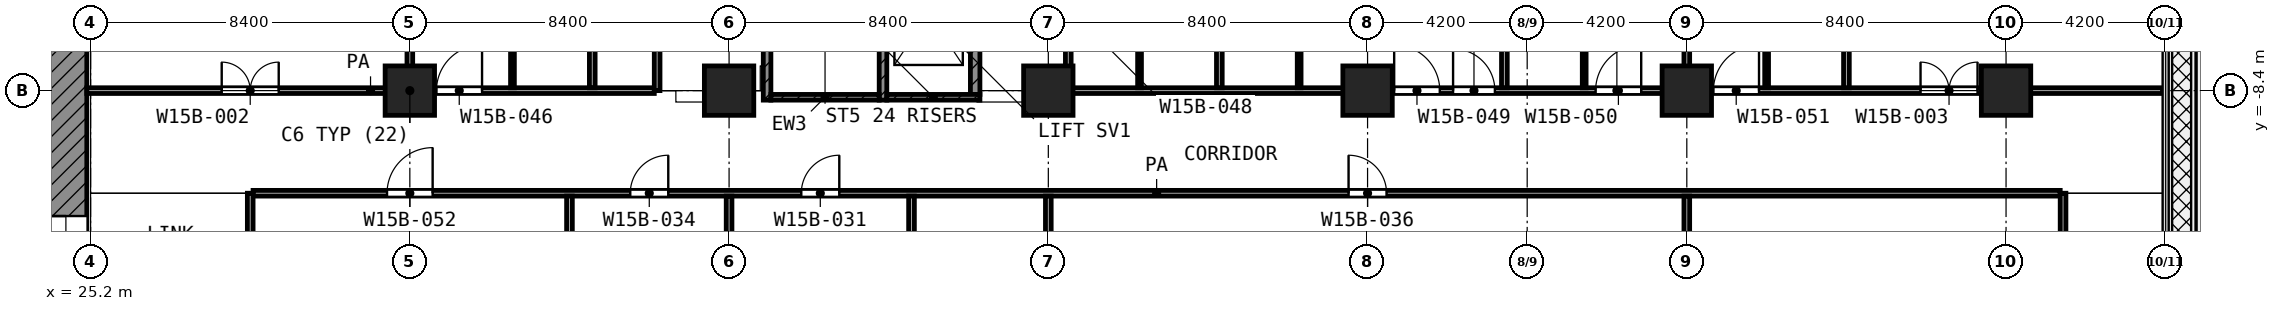
"""IFC4 building model, lengths in metres.
Left out: names, types, materials, properties, quantities, classifications, styles, units other than length and angle.
Written with IfcOpenShell. Run it as: python <this file> out.ifc"""

import sys

from ifc_helpers import new_model, si_unit, direction, frame, frame_2d, origin, origin_2d, place, context, subcontext, project, spatial, rectangle, extrude, element, fill, save


model = new_model("IFC4")
c1 = context("Model", 3, precision=1e-05, world=origin(), true_north=direction((0.0, 1.0)))
c2 = subcontext(c1, "Body", "Model", "MODEL_VIEW")
j1 = project(units=[si_unit("LENGTHUNIT", "METRE"), si_unit("PLANEANGLEUNIT", "RADIAN")], contexts=[c1])
p1 = place(None, origin())
s1 = spatial("IfcSite", under=j1, at=p1, CompositionType="ELEMENT")
p2 = place(p1, origin())
s2 = spatial("IfcBuilding", under=s1, at=p2, CompositionType="ELEMENT")
p3 = place(p2, frame((0.0, 0.0, 85.4)))
s3 = spatial("IfcBuildingStorey", under=s2, at=p3, CompositionType="ELEMENT", Elevation=85.4)
for number, where, z_axis, x_axis in (
    (1, (33.6, -8.4, 0.0), (0.0, 0.0, 1.0), (1.0, 0.0, 0.0)),
    (2, (42.0, -8.4, 0.0), (0.0, 0.0, 1.0), (1.0, 0.0, 0.0)),
    (3, (50.4, -8.4, 0.0), (0.0, 0.0, 1.0), (1.0, 0.0, 0.0)),
    (4, (58.8, -8.4, 0.0), (0.0, 0.0, 1.0), (1.0, 0.0, 0.0)),
    (5, (67.2, -8.4, 0.0), (0.0, 0.0, 1.0), (1.0, 0.0, 0.0)),
    (6, (75.6, -8.4, 0.0), (0.0, 0.0, 1.0), (1.0, 0.0, 0.0)),
):
    element("IfcColumn", number, at=place(p3, frame(where, z_axis=z_axis, x_axis=x_axis)), inside=s3, PredefinedType="COLUMN", context=c2, shape_type="SweptSolid", body=[
        extrude(rectangle(XDim=1.3, YDim=1.3, at=origin_2d()), origin(), (0.0, 0.0, 1.0), 4.2),
    ])
p4 = place(p3, frame((24.55, -24.0, 0.0), z_axis=(0.0, 0.0, 1.0), x_axis=(0.0, 1.0, 0.0)))
e7 = element("IfcWall", 7, at=p4, inside=s3, PredefinedType="SHEAR", context=c2, shape_type="SweptSolid", body=[
    extrude(rectangle(XDim=18.6, YDim=1.1, at=frame_2d((9.3, 0.0))), origin(), (0.0, 0.0, 1.0), 3.9),
])
p5 = place(p4, frame((10.5, 0.0, 0.0)))
e8 = element("IfcOpeningElement", 8, at=p5, cuts=e7, PredefinedType="OPENING", context=c2, shape_type="SweptSolid", body=[
    extrude(rectangle(XDim=1.8, YDim=2.1, at=frame_2d((0.9, 1.05))), frame((0.0, 0.56, 0.0), z_axis=(0.0, -1.0, 0.0), x_axis=(1.0, 0.0, 0.0)), (0.0, 0.0, 1.0), 1.12),
])
p6 = place(p3, frame((43.0, -8.65, 0.0), z_axis=(0.0, 0.0, 1.0), x_axis=(0.0, 1.0, 0.0)))
e9 = element("IfcWall", 9, at=p6, inside=s3, PredefinedType="SHEAR", context=c2, shape_type="SweptSolid", body=[
    extrude(rectangle(XDim=8.35, YDim=0.2, at=frame_2d((4.175, 0.0))), origin(), (0.0, 0.0, 1.0), 3.9),
])
p7 = place(p6, frame((7.0, 0.0, 0.0)))
e10 = element("IfcOpeningElement", 10, at=p7, cuts=e9, PredefinedType="OPENING", context=c2, shape_type="SweptSolid", body=[
    extrude(rectangle(XDim=1.1, YDim=2.1, at=frame_2d((0.55, 1.05))), frame((0.0, 0.11, 0.0), z_axis=(0.0, -1.0, 0.0), x_axis=(1.0, 0.0, 0.0)), (0.0, 0.0, 1.0), 0.22),
])
p8 = place(p3, frame((46.05, -8.65, 0.0), z_axis=(0.0, 0.0, 1.0), x_axis=(0.0, 1.0, 0.0)))
e11 = element("IfcWall", 11, at=p8, inside=s3, PredefinedType="SHEAR", context=c2, shape_type="SweptSolid", body=[
    extrude(rectangle(XDim=8.35, YDim=0.2, at=frame_2d((4.175, 0.0))), origin(), (0.0, 0.0, 1.0), 3.9),
])
p9 = place(p8, frame((7.0, 0.0, 0.0)))
e12 = element("IfcOpeningElement", 12, at=p9, cuts=e11, PredefinedType="OPENING", context=c2, shape_type="SweptSolid", body=[
    extrude(rectangle(XDim=1.1, YDim=2.1, at=frame_2d((0.55, 1.05))), frame((0.0, 0.11, 0.0), z_axis=(0.0, -1.0, 0.0), x_axis=(1.0, 0.0, 0.0)), (0.0, 0.0, 1.0), 0.22),
])
p10 = place(p3, frame((43.1, -8.575, 0.0), z_axis=(0.0, 0.0, 1.0), x_axis=(1.0, 0.0, 0.0)))
e13 = element("IfcWall", 13, at=p10, inside=s3, PredefinedType="SHEAR", context=c2, shape_type="SweptSolid", body=[
    extrude(rectangle(XDim=2.85, YDim=0.15, at=frame_2d((1.425, 0.0))), origin(), (0.0, 0.0, 1.0), 3.9),
])
p11 = place(p3, frame((46.15, -8.575, 0.0), z_axis=(0.0, 0.0, 1.0), x_axis=(1.0, 0.0, 0.0)))
e14 = element("IfcWall", 14, at=p11, inside=s3, PredefinedType="SHEAR", context=c2, shape_type="SweptSolid", body=[
    extrude(rectangle(XDim=2.45, YDim=0.15, at=frame_2d((1.225, 0.0))), origin(), (0.0, 0.0, 1.0), 3.9),
])
p12 = place(p3, frame((48.475, -8.5, 0.0), z_axis=(0.0, 0.0, 1.0), x_axis=(0.0, 1.0, 0.0)))
e15 = element("IfcWall", 15, at=p12, inside=s3, PredefinedType="SHEAR", context=c2, shape_type="SweptSolid", body=[
    extrude(rectangle(XDim=3.475, YDim=0.25, at=frame_2d((1.738, 0.0))), origin(), (0.0, 0.0, 1.0), 3.9),
])
p13 = place(p3, frame((36.3, -8.325, 0.0), z_axis=(0.0, 0.0, 1.0), x_axis=(0.0, 1.0, 0.0)))
e16 = element("IfcWall", 16, at=p13, inside=s3, PredefinedType="PARTITIONING", context=c2, shape_type="SweptSolid", body=[
    extrude(rectangle(XDim=2.625, YDim=0.1, at=frame_2d((1.312, 0.0))), origin(), (0.0, 0.0, 1.0), 3.9),
])
p14 = place(p3, frame((52.8, -8.325, 0.0), z_axis=(0.0, 0.0, 1.0), x_axis=(0.0, 1.0, 0.0)))
e17 = element("IfcWall", 17, at=p14, inside=s3, PredefinedType="PARTITIONING", context=c2, shape_type="SweptSolid", body=[
    extrude(rectangle(XDim=3.225, YDim=0.1, at=frame_2d((1.612, 0.0))), origin(), (0.0, 0.0, 1.0), 3.9),
])
p15 = place(p3, frame((57.0, -8.325, 0.0), z_axis=(0.0, 0.0, 1.0), x_axis=(0.0, 1.0, 0.0)))
e18 = element("IfcWall", 18, at=p15, inside=s3, PredefinedType="PARTITIONING", context=c2, shape_type="SweptSolid", body=[
    extrude(rectangle(XDim=2.624, YDim=0.1, at=frame_2d((1.312, 0.0))), origin(), (0.0, 0.0, 1.0), 3.9),
])
for number, where, z_axis, x_axis in (
    (19, (64.5, -8.325, 0.0), (0.0, 0.0, 1.0), (0.0, 1.0, 0.0)),
    (20, (69.3, -8.325, 0.0), (0.0, 0.0, 1.0), (0.0, 1.0, 0.0)),
):
    element("IfcWall", number, at=place(p3, frame(where, z_axis=z_axis, x_axis=x_axis)), inside=s3, PredefinedType="PARTITIONING", context=c2, shape_type="SweptSolid", body=[
        extrude(rectangle(XDim=2.625, YDim=0.1, at=frame_2d((1.312, 0.0))), origin(), (0.0, 0.0, 1.0), 3.9),
    ])
p16 = place(p3, frame((29.475, -11.1, 0.0), z_axis=(0.0, 0.0, 1.0), x_axis=(1.0, 0.0, 0.0)))
e21 = element("IfcWall", 21, at=p16, inside=s3, PredefinedType="PARTITIONING", context=c2, shape_type="SweptSolid", body=[
    extrude(rectangle(XDim=47.55, YDim=0.15, at=frame_2d((23.775, 0.0))), origin(), (0.0, 0.0, 1.0), 3.9),
])
p17 = place(p16, frame((3.525, 0.0, 0.0)))
e22 = element("IfcOpeningElement", 22, at=p17, cuts=e21, PredefinedType="OPENING", context=c2, shape_type="SweptSolid", body=[
    extrude(rectangle(XDim=1.2, YDim=2.1, at=frame_2d((0.6, 1.05))), frame((0.0, 0.085, 0.0), z_axis=(0.0, -1.0, 0.0), x_axis=(1.0, 0.0, 0.0)), (0.0, 0.0, 1.0), 0.17),
])
p18 = place(p16, frame((9.925, 0.0, 0.0)))
e23 = element("IfcOpeningElement", 23, at=p18, cuts=e21, PredefinedType="OPENING", context=c2, shape_type="SweptSolid", body=[
    extrude(rectangle(XDim=1.0, YDim=2.1, at=frame_2d((0.5, 1.05))), frame((0.0, 0.085, 0.0), z_axis=(0.0, -1.0, 0.0), x_axis=(1.0, 0.0, 0.0)), (0.0, 0.0, 1.0), 0.17),
])
p19 = place(p16, frame((14.425, 0.0, 0.0)))
e24 = element("IfcOpeningElement", 24, at=p19, cuts=e21, PredefinedType="OPENING", context=c2, shape_type="SweptSolid", body=[
    extrude(rectangle(XDim=1.0, YDim=2.1, at=frame_2d((0.5, 1.05))), frame((0.0, 0.085, 0.0), z_axis=(0.0, -1.0, 0.0), x_axis=(1.0, 0.0, 0.0)), (0.0, 0.0, 1.0), 0.17),
])
p20 = place(p16, frame((28.825, 0.0, 0.0)))
e25 = element("IfcOpeningElement", 25, at=p20, cuts=e21, PredefinedType="OPENING", context=c2, shape_type="SweptSolid", body=[
    extrude(rectangle(XDim=1.0, YDim=2.1, at=frame_2d((0.5, 1.05))), frame((0.0, 0.085, 0.0), z_axis=(0.0, -1.0, 0.0), x_axis=(1.0, 0.0, 0.0)), (0.0, 0.0, 1.0), 0.17),
])
p21 = place(p3, frame((25.1, -8.4, 0.0), z_axis=(0.0, 0.0, 1.0), x_axis=(1.0, 0.0, 0.0)))
e26 = element("IfcWall", 26, at=p21, inside=s3, PredefinedType="PARTITIONING", context=c2, shape_type="SweptSolid", body=[
    extrude(rectangle(XDim=14.932, YDim=0.15, at=frame_2d((7.466, 0.0))), origin(), (0.0, 0.0, 1.0), 3.9),
])
p22 = place(p21, frame((3.55, 0.0, 0.0)))
e27 = element("IfcOpeningElement", 27, at=p22, cuts=e26, PredefinedType="OPENING", context=c2, shape_type="SweptSolid", body=[
    extrude(rectangle(XDim=1.5, YDim=2.1, at=frame_2d((0.75, 1.05))), frame((0.0, 0.085, 0.0), z_axis=(0.0, -1.0, 0.0), x_axis=(1.0, 0.0, 0.0)), (0.0, 0.0, 1.0), 0.17),
])
p23 = place(p21, frame((9.2, 0.0, 0.0)))
e28 = element("IfcOpeningElement", 28, at=p23, cuts=e26, PredefinedType="OPENING", context=c2, shape_type="SweptSolid", body=[
    extrude(rectangle(XDim=1.2, YDim=2.1, at=frame_2d((0.6, 1.05))), frame((0.0, 0.085, 0.0), z_axis=(0.0, -1.0, 0.0), x_axis=(1.0, 0.0, 0.0)), (0.0, 0.0, 1.0), 0.17),
])
p24 = place(p3, frame((51.0, -8.4, 0.0), z_axis=(0.0, 0.0, 1.0), x_axis=(1.0, 0.0, 0.0)))
e29 = element("IfcWall", 29, at=p24, inside=s3, PredefinedType="PARTITIONING", context=c2, shape_type="SweptSolid", body=[
    extrude(rectangle(XDim=28.72, YDim=0.15, at=frame_2d((14.36, 0.0))), origin(), (0.0, 0.0, 1.0), 3.9),
])
p25 = place(p24, frame((8.5, 0.0, 0.0)))
e30 = element("IfcOpeningElement", 30, at=p25, cuts=e29, PredefinedType="OPENING", context=c2, shape_type="SweptSolid", body=[
    extrude(rectangle(XDim=1.2, YDim=2.1, at=frame_2d((0.6, 1.05))), frame((0.0, 0.085, 0.0), z_axis=(0.0, -1.0, 0.0), x_axis=(1.0, 0.0, 0.0)), (0.0, 0.0, 1.0), 0.17),
])
p26 = place(p24, frame((10.05, 0.0, 0.0)))
e31 = element("IfcOpeningElement", 31, at=p26, cuts=e29, PredefinedType="OPENING", context=c2, shape_type="SweptSolid", body=[
    extrude(rectangle(XDim=1.1, YDim=2.1, at=frame_2d((0.55, 1.05))), frame((0.0, 0.085, 0.0), z_axis=(0.0, -1.0, 0.0), x_axis=(1.0, 0.0, 0.0)), (0.0, 0.0, 1.0), 0.17),
])
p27 = place(p24, frame((13.8, 0.0, 0.0)))
e32 = element("IfcOpeningElement", 32, at=p27, cuts=e29, PredefinedType="OPENING", context=c2, shape_type="SweptSolid", body=[
    extrude(rectangle(XDim=1.2, YDim=2.1, at=frame_2d((0.6, 1.05))), frame((0.0, 0.085, 0.0), z_axis=(0.0, -1.0, 0.0), x_axis=(1.0, 0.0, 0.0)), (0.0, 0.0, 1.0), 0.17),
])
p28 = place(p24, frame((16.9, 0.0, 0.0)))
e33 = element("IfcOpeningElement", 33, at=p28, cuts=e29, PredefinedType="OPENING", context=c2, shape_type="SweptSolid", body=[
    extrude(rectangle(XDim=1.2, YDim=2.1, at=frame_2d((0.6, 1.05))), frame((0.0, 0.085, 0.0), z_axis=(0.0, -1.0, 0.0), x_axis=(1.0, 0.0, 0.0)), (0.0, 0.0, 1.0), 0.17),
])
p29 = place(p24, frame((22.35, 0.0, 0.0)))
e34 = element("IfcOpeningElement", 34, at=p29, cuts=e29, PredefinedType="OPENING", context=c2, shape_type="SweptSolid", body=[
    extrude(rectangle(XDim=1.5, YDim=2.1, at=frame_2d((0.75, 1.05))), frame((0.0, 0.085, 0.0), z_axis=(0.0, -1.0, 0.0), x_axis=(1.0, 0.0, 0.0)), (0.0, 0.0, 1.0), 0.17),
])
p30 = place(p3, frame((29.4, -14.1, 0.0), z_axis=(0.0, 0.0, 1.0), x_axis=(0.0, 1.0, 0.0)))
e35 = element("IfcWall", 35, at=p30, inside=s3, PredefinedType="PARTITIONING", context=c2, shape_type="SweptSolid", body=[
    extrude(rectangle(XDim=3.0, YDim=0.15, at=frame_2d((1.5, 0.0))), origin(), (0.0, 0.0, 1.0), 3.9),
])
p31 = place(p3, frame((33.6, -8.325, 0.0), z_axis=(0.0, 0.0, 1.0), x_axis=(0.0, 1.0, 0.0)))
e36 = element("IfcWall", 36, at=p31, inside=s3, PredefinedType="PARTITIONING", context=c2, shape_type="SweptSolid", body=[
    extrude(rectangle(XDim=8.245, YDim=0.15, at=frame_2d((4.123, 0.0))), origin(), (0.0, 0.0, 1.0), 3.9),
])
p32 = place(p3, frame((37.8, -14.025, 0.0), z_axis=(0.0, 0.0, 1.0), x_axis=(0.0, 1.0, 0.0)))
e37 = element("IfcWall", 37, at=p32, inside=s3, PredefinedType="PARTITIONING", context=c2, shape_type="SweptSolid", body=[
    extrude(rectangle(XDim=2.85, YDim=0.15, at=frame_2d((1.425, 0.0))), origin(), (0.0, 0.0, 1.0), 3.9),
])
p33 = place(p3, frame((38.4, -8.325, 0.0), z_axis=(0.0, 0.0, 1.0), x_axis=(0.0, 1.0, 0.0)))
e38 = element("IfcWall", 38, at=p33, inside=s3, PredefinedType="PARTITIONING", context=c2, shape_type="SweptSolid", body=[
    extrude(rectangle(XDim=8.245, YDim=0.15, at=frame_2d((4.123, 0.0))), origin(), (0.0, 0.0, 1.0), 3.9),
])
p34 = place(p3, frame((40.107, -8.4, 0.0), z_axis=(0.0, 0.0, 1.0), x_axis=(0.0, 1.0, 0.0)))
e39 = element("IfcWall", 39, at=p34, inside=s3, PredefinedType="PARTITIONING", context=c2, shape_type="SweptSolid", body=[
    extrude(rectangle(XDim=8.32, YDim=0.15, at=frame_2d((4.16, 0.0))), origin(), (0.0, 0.0, 1.0), 3.9),
])
p35 = place(p34, frame((3.75, 0.0, 0.0)))
e40 = element("IfcOpeningElement", 40, at=p35, cuts=e39, PredefinedType="OPENING", context=c2, shape_type="SweptSolid", body=[
    extrude(rectangle(XDim=0.9, YDim=2.1, at=frame_2d((0.45, 1.05))), frame((0.0, 0.085, 0.0), z_axis=(0.0, -1.0, 0.0), x_axis=(1.0, 0.0, 0.0)), (0.0, 0.0, 1.0), 0.17),
])
for number, where, z_axis, x_axis in (
    (41, (42.0, -14.025, 0.0), (0.0, 0.0, 1.0), (0.0, 1.0, 0.0)),
    (42, (46.8, -14.025, 0.0), (0.0, 0.0, 1.0), (0.0, 1.0, 0.0)),
    (43, (50.4, -14.025, 0.0), (0.0, 0.0, 1.0), (0.0, 1.0, 0.0)),
):
    element("IfcWall", number, at=place(p3, frame(where, z_axis=z_axis, x_axis=x_axis)), inside=s3, PredefinedType="PARTITIONING", context=c2, shape_type="SweptSolid", body=[
        extrude(rectangle(XDim=2.85, YDim=0.15, at=frame_2d((1.425, 0.0))), origin(), (0.0, 0.0, 1.0), 3.9),
    ])
p36 = place(p3, frame((50.925, -8.4, 0.0), z_axis=(0.0, 0.0, 1.0), x_axis=(0.0, 1.0, 0.0)))
e44 = element("IfcWall", 44, at=p36, inside=s3, PredefinedType="PARTITIONING", context=c2, shape_type="SweptSolid", body=[
    extrude(rectangle(XDim=6.55, YDim=0.15, at=frame_2d((3.275, 0.0))), origin(), (0.0, 0.0, 1.0), 3.9),
])
p37 = place(p36, frame((3.767, 0.0, 0.0)))
e45 = element("IfcOpeningElement", 45, at=p37, cuts=e44, PredefinedType="OPENING", context=c2, shape_type="SweptSolid", body=[
    extrude(rectangle(XDim=1.2, YDim=2.1, at=frame_2d((0.6, 1.05))), frame((0.0, 0.085, 0.0), z_axis=(0.0, -1.0, 0.0), x_axis=(1.0, 0.0, 0.0)), (0.0, 0.0, 1.0), 0.17),
])
p38 = place(p36, frame((1.583, 0.0, 0.0)))
e46 = element("IfcOpeningElement", 46, at=p38, cuts=e44, PredefinedType="OPENING", context=c2, shape_type="SweptSolid", body=[
    extrude(rectangle(XDim=1.2, YDim=2.1, at=frame_2d((0.6, 1.05))), frame((0.0, 0.085, 0.0), z_axis=(0.0, -1.0, 0.0), x_axis=(1.0, 0.0, 0.0)), (0.0, 0.0, 1.0), 0.17),
])
for number, where, z_axis, x_axis in (
    (47, (54.9, -8.325, 0.0), (0.0, 0.0, 1.0), (0.0, 1.0, 0.0)),
    (48, (62.4, -8.325, 0.0), (0.0, 0.0, 1.0), (0.0, 1.0, 0.0)),
):
    element("IfcWall", number, at=place(p3, frame(where, z_axis=z_axis, x_axis=x_axis)), inside=s3, PredefinedType="PARTITIONING", context=c2, shape_type="SweptSolid", body=[
        extrude(rectangle(XDim=8.245, YDim=0.15, at=frame_2d((4.123, 0.0))), origin(), (0.0, 0.0, 1.0), 3.9),
    ])
p39 = place(p3, frame((67.2, -14.025, 0.0), z_axis=(0.0, 0.0, 1.0), x_axis=(0.0, 1.0, 0.0)))
e49 = element("IfcWall", 49, at=p39, inside=s3, PredefinedType="PARTITIONING", context=c2, shape_type="SweptSolid", body=[
    extrude(rectangle(XDim=2.85, YDim=0.15, at=frame_2d((1.425, 0.0))), origin(), (0.0, 0.0, 1.0), 3.9),
])
for number, where, z_axis, x_axis in (
    (50, (67.2, -8.325, 0.0), (0.0, 0.0, 1.0), (0.0, 1.0, 0.0)),
    (51, (71.4, -8.325, 0.0), (0.0, 0.0, 1.0), (0.0, 1.0, 0.0)),
):
    element("IfcWall", number, at=place(p3, frame(where, z_axis=z_axis, x_axis=x_axis)), inside=s3, PredefinedType="PARTITIONING", context=c2, shape_type="SweptSolid", body=[
        extrude(rectangle(XDim=8.245, YDim=0.15, at=frame_2d((4.123, 0.0))), origin(), (0.0, 0.0, 1.0), 3.9),
    ])
p40 = place(p3, frame((77.1, -14.1, 0.0), z_axis=(0.0, 0.0, 1.0), x_axis=(0.0, 1.0, 0.0)))
e52 = element("IfcWall", 52, at=p40, inside=s3, PredefinedType="PARTITIONING", context=c2, shape_type="SweptSolid", body=[
    extrude(rectangle(XDim=3.0, YDim=0.15, at=frame_2d((1.5, 0.0))), origin(), (0.0, 0.0, 1.0), 3.9),
])
p41 = place(p5, origin())
e53 = element("IfcDoor", 53, at=p41, inside=s3, OperationType="DOUBLE_DOOR_SINGLE_SWING", PredefinedType="DOOR", context=c2, shape_type="SweptSolid", body=[
    extrude(rectangle(XDim=1.8, YDim=2.1, at=frame_2d((0.9, 1.05))), frame((0.0, 0.025, 0.0), z_axis=(0.0, -1.0, 0.0), x_axis=(1.0, 0.0, 0.0)), (0.0, 0.0, 1.0), 0.05),
])
fill(e8, e53)
p42 = place(p22, origin())
e54 = element("IfcDoor", 54, at=p42, inside=s3, OperationType="DOUBLE_DOOR_SINGLE_SWING", PredefinedType="DOOR", context=c2, shape_type="SweptSolid", body=[
    extrude(rectangle(XDim=1.5, YDim=2.1, at=frame_2d((0.75, 1.05))), frame((0.0, 0.025, 0.0), z_axis=(0.0, -1.0, 0.0), x_axis=(1.0, 0.0, 0.0)), (0.0, 0.0, 1.0), 0.05),
])
fill(e27, e54)
p43 = place(p23, origin())
e55 = element("IfcDoor", 55, at=p43, inside=s3, OperationType="SINGLE_SWING_RIGHT", PredefinedType="DOOR", context=c2, shape_type="SweptSolid", body=[
    extrude(rectangle(XDim=1.2, YDim=2.1, at=frame_2d((0.6, 1.05))), frame((0.0, 0.025, 0.0), z_axis=(0.0, -1.0, 0.0), x_axis=(1.0, 0.0, 0.0)), (0.0, 0.0, 1.0), 0.05),
])
fill(e28, e55)
p44 = place(p25, origin())
e56 = element("IfcDoor", 56, at=p44, inside=s3, OperationType="SINGLE_SWING_LEFT", PredefinedType="DOOR", context=c2, shape_type="SweptSolid", body=[
    extrude(rectangle(XDim=1.2, YDim=2.1, at=frame_2d((0.6, 1.05))), frame((0.0, 0.025, 0.0), z_axis=(0.0, -1.0, 0.0), x_axis=(1.0, 0.0, 0.0)), (0.0, 0.0, 1.0), 0.05),
])
fill(e30, e56)
p45 = place(p26, origin())
e57 = element("IfcDoor", 57, at=p45, inside=s3, OperationType="SINGLE_SWING_LEFT", PredefinedType="DOOR", context=c2, shape_type="SweptSolid", body=[
    extrude(rectangle(XDim=1.1, YDim=2.1, at=frame_2d((0.55, 1.05))), frame((0.0, 0.025, 0.0), z_axis=(0.0, -1.0, 0.0), x_axis=(1.0, 0.0, 0.0)), (0.0, 0.0, 1.0), 0.05),
])
fill(e31, e57)
p46 = place(p27, origin())
e58 = element("IfcDoor", 58, at=p46, inside=s3, OperationType="SINGLE_SWING_RIGHT", PredefinedType="DOOR", context=c2, shape_type="SweptSolid", body=[
    extrude(rectangle(XDim=1.2, YDim=2.1, at=frame_2d((0.6, 1.05))), frame((0.0, 0.025, 0.0), z_axis=(0.0, -1.0, 0.0), x_axis=(1.0, 0.0, 0.0)), (0.0, 0.0, 1.0), 0.05),
])
fill(e32, e58)
p47 = place(p28, origin())
e59 = element("IfcDoor", 59, at=p47, inside=s3, OperationType="SINGLE_SWING_RIGHT", PredefinedType="DOOR", context=c2, shape_type="SweptSolid", body=[
    extrude(rectangle(XDim=1.2, YDim=2.1, at=frame_2d((0.6, 1.05))), frame((0.0, 0.025, 0.0), z_axis=(0.0, -1.0, 0.0), x_axis=(1.0, 0.0, 0.0)), (0.0, 0.0, 1.0), 0.05),
])
fill(e33, e59)
p48 = place(p29, origin())
e60 = element("IfcDoor", 60, at=p48, inside=s3, OperationType="DOUBLE_DOOR_SINGLE_SWING", PredefinedType="DOOR", context=c2, shape_type="SweptSolid", body=[
    extrude(rectangle(XDim=1.5, YDim=2.1, at=frame_2d((0.75, 1.05))), frame((0.0, 0.025, 0.0), z_axis=(0.0, -1.0, 0.0), x_axis=(1.0, 0.0, 0.0)), (0.0, 0.0, 1.0), 0.05),
])
fill(e34, e60)
p49 = place(p17, origin())
e61 = element("IfcDoor", 61, at=p49, inside=s3, OperationType="SINGLE_SWING_RIGHT", PredefinedType="DOOR", context=c2, shape_type="SweptSolid", body=[
    extrude(rectangle(XDim=1.2, YDim=2.1, at=frame_2d((0.6, 1.05))), frame((0.0, 0.025, 0.0), z_axis=(0.0, -1.0, 0.0), x_axis=(1.0, 0.0, 0.0)), (0.0, 0.0, 1.0), 0.05),
])
fill(e22, e61)
p50 = place(p18, origin())
e62 = element("IfcDoor", 62, at=p50, inside=s3, OperationType="SINGLE_SWING_RIGHT", PredefinedType="DOOR", context=c2, shape_type="SweptSolid", body=[
    extrude(rectangle(XDim=1.0, YDim=2.1, at=frame_2d((0.5, 1.05))), frame((0.0, 0.025, 0.0), z_axis=(0.0, -1.0, 0.0), x_axis=(1.0, 0.0, 0.0)), (0.0, 0.0, 1.0), 0.05),
])
fill(e23, e62)
p51 = place(p19, origin())
e63 = element("IfcDoor", 63, at=p51, inside=s3, OperationType="SINGLE_SWING_RIGHT", PredefinedType="DOOR", context=c2, shape_type="SweptSolid", body=[
    extrude(rectangle(XDim=1.0, YDim=2.1, at=frame_2d((0.5, 1.05))), frame((0.0, 0.025, 0.0), z_axis=(0.0, -1.0, 0.0), x_axis=(1.0, 0.0, 0.0)), (0.0, 0.0, 1.0), 0.05),
])
fill(e24, e63)
p52 = place(p20, origin())
e64 = element("IfcDoor", 64, at=p52, inside=s3, OperationType="SINGLE_SWING_LEFT", PredefinedType="DOOR", context=c2, shape_type="SweptSolid", body=[
    extrude(rectangle(XDim=1.0, YDim=2.1, at=frame_2d((0.5, 1.05))), frame((0.0, 0.025, 0.0), z_axis=(0.0, -1.0, 0.0), x_axis=(1.0, 0.0, 0.0)), (0.0, 0.0, 1.0), 0.05),
])
fill(e25, e64)
save(model, sys.argv[1])
